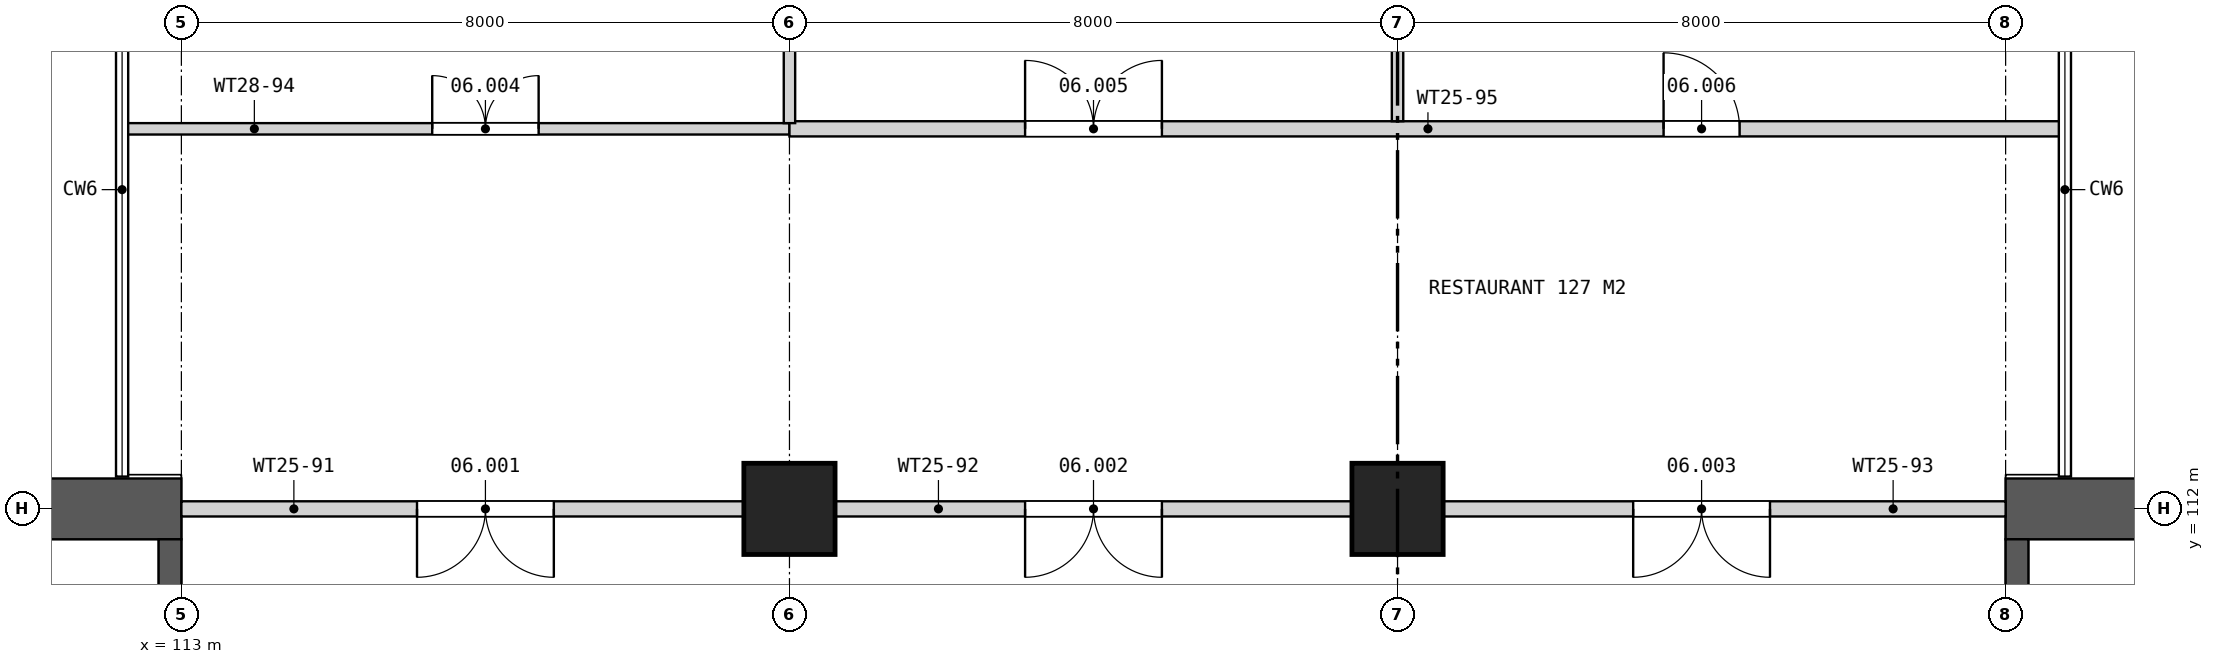
"""IFC4 building model, lengths in metres.
Left out: names, types, materials, properties, quantities, classifications, styles, units other than length and angle.
Written with IfcOpenShell. Run it as: python <this file> out.ifc"""

import sys

from ifc_helpers import new_model, si_unit, direction, frame, frame_2d, origin, origin_2d, place, context, subcontext, project, spatial, rectangle, extrude, element, fill, save


model = new_model("IFC4")
c1 = context("Model", 3, precision=1e-05, world=origin(), true_north=direction((0.0, 1.0)))
c2 = subcontext(c1, "Body", "Model", "MODEL_VIEW")
j1 = project(units=[si_unit("LENGTHUNIT", "METRE"), si_unit("PLANEANGLEUNIT", "RADIAN")], contexts=[c1])
p1 = place(None, origin())
s1 = spatial("IfcSite", under=j1, at=p1, CompositionType="ELEMENT")
p2 = place(p1, origin())
s2 = spatial("IfcBuilding", under=s1, at=p2, CompositionType="ELEMENT")
p3 = place(p2, frame((0.0, 0.0, 47.5)))
s3 = spatial("IfcBuildingStorey", under=s2, at=p3, CompositionType="ELEMENT", Elevation=47.5)
for number, where, z_axis, x_axis in (
    (1, (121.0, 112.0, 0.0), (0.0, 0.0, 1.0), (1.0, 0.0, 0.0)),
    (2, (129.0, 112.0, 0.0), (0.0, 0.0, 1.0), (1.0, 0.0, 0.0)),
):
    element("IfcColumn", number, at=place(p3, frame(where, z_axis=z_axis, x_axis=x_axis)), inside=s3, PredefinedType="COLUMN", context=c2, shape_type="SweptSolid", body=[
        extrude(rectangle(XDim=1.2, YDim=1.2, at=origin_2d()), origin(), (0.0, 0.0, 1.0), 6.0),
    ])
p4 = place(p3, frame((137.0, 112.0, 0.0), z_axis=(0.0, 0.0, 1.0), x_axis=(1.0, 0.0, 0.0)))
e3 = element("IfcWall", 3, at=p4, inside=s3, PredefinedType="SHEAR", context=c2, shape_type="SweptSolid", body=[
    extrude(rectangle(XDim=7.1, YDim=0.8, at=frame_2d((3.55, 0.0))), origin(), (0.0, 0.0, 1.0), 6.0),
])
p5 = place(p3, frame((137.15, 105.7, 0.0), z_axis=(0.0, 0.0, 1.0), x_axis=(0.0, 1.0, 0.0)))
e4 = element("IfcWall", 4, at=p5, inside=s3, PredefinedType="SHEAR", context=c2, shape_type="SweptSolid", body=[
    extrude(rectangle(XDim=5.9, YDim=0.3, at=frame_2d((2.95, 0.0))), origin(), (0.0, 0.0, 1.0), 6.0),
])
p6 = place(p3, frame((113.0, 112.0, 0.0), z_axis=(0.0, 0.0, 1.0), x_axis=(-1.0, 0.0, 0.0)))
e5 = element("IfcWall", 5, at=p6, inside=s3, PredefinedType="SHEAR", context=c2, shape_type="SweptSolid", body=[
    extrude(rectangle(XDim=7.1, YDim=0.8, at=frame_2d((3.55, 0.0))), origin(), (0.0, 0.0, 1.0), 6.0),
])
p7 = place(p3, frame((112.85, 111.6, 0.0), z_axis=(0.0, 0.0, 1.0), x_axis=(0.0, -1.0, 0.0)))
e6 = element("IfcWall", 6, at=p7, inside=s3, PredefinedType="SHEAR", context=c2, shape_type="SweptSolid", body=[
    extrude(rectangle(XDim=5.9, YDim=0.3, at=frame_2d((2.95, 0.0))), origin(), (0.0, 0.0, 1.0), 6.0),
])
p8 = place(p3, frame((113.0, 112.0, 0.0), z_axis=(0.0, 0.0, 1.0), x_axis=(1.0, 0.0, 0.0)))
e7 = element("IfcWall", 7, at=p8, inside=s3, PredefinedType="PARTITIONING", context=c2, shape_type="SweptSolid", body=[
    extrude(rectangle(XDim=7.4, YDim=0.2, at=frame_2d((3.7, 0.0))), origin(), (0.0, 0.0, 1.0), 5.256),
])
p9 = place(p8, frame((3.1, 0.0, 0.0)))
e8 = element("IfcOpeningElement", 8, at=p9, cuts=e7, PredefinedType="OPENING", context=c2, shape_type="SweptSolid", body=[
    extrude(rectangle(XDim=1.8, YDim=2.4, at=frame_2d((0.9, 1.2))), frame((0.0, 0.11, 0.0), z_axis=(0.0, -1.0, 0.0), x_axis=(1.0, 0.0, 0.0)), (0.0, 0.0, 1.0), 0.22),
])
p10 = place(p3, frame((121.6, 112.0, 0.0), z_axis=(0.0, 0.0, 1.0), x_axis=(1.0, 0.0, 0.0)))
e9 = element("IfcWall", 9, at=p10, inside=s3, PredefinedType="PARTITIONING", context=c2, shape_type="SweptSolid", body=[
    extrude(rectangle(XDim=6.8, YDim=0.2, at=frame_2d((3.4, 0.0))), origin(), (0.0, 0.0, 1.0), 5.26),
])
p11 = place(p10, frame((2.5, 0.0, 0.0)))
e10 = element("IfcOpeningElement", 10, at=p11, cuts=e9, PredefinedType="OPENING", context=c2, shape_type="SweptSolid", body=[
    extrude(rectangle(XDim=1.8, YDim=2.4, at=frame_2d((0.9, 1.2))), frame((0.0, 0.11, 0.0), z_axis=(0.0, -1.0, 0.0), x_axis=(1.0, 0.0, 0.0)), (0.0, 0.0, 1.0), 0.22),
])
p12 = place(p3, frame((129.6, 112.0, 0.0), z_axis=(0.0, 0.0, 1.0), x_axis=(1.0, 0.0, 0.0)))
e11 = element("IfcWall", 11, at=p12, inside=s3, PredefinedType="PARTITIONING", context=c2, shape_type="SweptSolid", body=[
    extrude(rectangle(XDim=7.4, YDim=0.2, at=frame_2d((3.7, 0.0))), origin(), (0.0, 0.0, 1.0), 5.256),
])
p13 = place(p12, frame((2.5, 0.0, 0.0)))
e12 = element("IfcOpeningElement", 12, at=p13, cuts=e11, PredefinedType="OPENING", context=c2, shape_type="SweptSolid", body=[
    extrude(rectangle(XDim=1.8, YDim=2.4, at=frame_2d((0.9, 1.2))), frame((0.0, 0.11, 0.0), z_axis=(0.0, -1.0, 0.0), x_axis=(1.0, 0.0, 0.0)), (0.0, 0.0, 1.0), 0.22),
])
p14 = place(p3, frame((112.2, 117.0, 0.0), z_axis=(0.0, 0.0, 1.0), x_axis=(1.0, 0.0, 0.0)))
e13 = element("IfcWall", 13, at=p14, inside=s3, PredefinedType="SOLIDWALL", context=c2, shape_type="SweptSolid", body=[
    extrude(rectangle(XDim=8.8, YDim=0.15, at=frame_2d((4.4, 0.0))), origin(), (0.0, 0.0, 1.0), 5.26),
])
p15 = place(p14, frame((4.1, 0.0, 0.0)))
e14 = element("IfcOpeningElement", 14, at=p15, cuts=e13, PredefinedType="OPENING", context=c2, shape_type="SweptSolid", body=[
    extrude(rectangle(XDim=1.4, YDim=2.2, at=frame_2d((0.7, 1.1))), frame((0.0, 0.085, 0.0), z_axis=(0.0, -1.0, 0.0), x_axis=(1.0, 0.0, 0.0)), (0.0, 0.0, 1.0), 0.17),
])
p16 = place(p3, frame((121.0, 117.0, 0.0), z_axis=(0.0, 0.0, 1.0), x_axis=(1.0, 0.0, 0.0)))
e15 = element("IfcWall", 15, at=p16, inside=s3, PredefinedType="PARTITIONING", context=c2, shape_type="SweptSolid", body=[
    extrude(rectangle(XDim=16.8, YDim=0.2, at=frame_2d((8.4, 0.0))), origin(), (0.0, 0.0, 1.0), 5.26),
])
p17 = place(p16, frame((3.1, 0.0, 0.0)))
e16 = element("IfcOpeningElement", 16, at=p17, cuts=e15, PredefinedType="OPENING", context=c2, shape_type="SweptSolid", body=[
    extrude(rectangle(XDim=1.8, YDim=2.4, at=frame_2d((0.9, 1.2))), frame((0.0, 0.11, 0.0), z_axis=(0.0, -1.0, 0.0), x_axis=(1.0, 0.0, 0.0)), (0.0, 0.0, 1.0), 0.22),
])
p18 = place(p16, frame((11.5, 0.0, 0.0)))
e17 = element("IfcOpeningElement", 17, at=p18, cuts=e15, PredefinedType="OPENING", context=c2, shape_type="SweptSolid", body=[
    extrude(rectangle(XDim=1.0, YDim=2.1, at=frame_2d((0.5, 1.05))), frame((0.0, 0.11, 0.0), z_axis=(0.0, -1.0, 0.0), x_axis=(1.0, 0.0, 0.0)), (0.0, 0.0, 1.0), 0.22),
])
p19 = place(p3, frame((121.0, 117.075, 0.0), z_axis=(0.0, 0.0, 1.0), x_axis=(0.0, 1.0, 0.0)))
e18 = element("IfcWall", 18, at=p19, inside=s3, PredefinedType="SOLIDWALL", context=c2, shape_type="SweptSolid", body=[
    extrude(rectangle(XDim=19.625, YDim=0.15, at=frame_2d((9.812, 0.0))), origin(), (0.0, 0.0, 1.0), 2.7),
])
p20 = place(p19, frame((6.225, 0.0, 0.0)))
e19 = element("IfcOpeningElement", 19, at=p20, cuts=e18, PredefinedType="OPENING", context=c2, shape_type="SweptSolid", body=[
    extrude(rectangle(XDim=1.4, YDim=2.2, at=frame_2d((0.7, 1.1))), frame((0.0, 0.085, 0.0), z_axis=(0.0, -1.0, 0.0), x_axis=(1.0, 0.0, 0.0)), (0.0, 0.0, 1.0), 0.17),
])
p21 = place(p3, frame((129.0, 117.1, 0.0), z_axis=(0.0, 0.0, 1.0), x_axis=(0.0, 1.0, 0.0)))
e20 = element("IfcWall", 20, at=p21, inside=s3, PredefinedType="PARTITIONING", context=c2, shape_type="SweptSolid", body=[
    extrude(rectangle(XDim=10.9, YDim=0.15, at=frame_2d((5.45, 0.0))), origin(), (0.0, 0.0, 1.0), 2.7),
])
p22 = place(p9, frame((1.8, 0.0, 0.0), z_axis=(0.0, 0.0, 1.0), x_axis=(-1.0, 0.0, 0.0)))
e21 = element("IfcDoor", 21, at=p22, inside=s3, OperationType="DOUBLE_DOOR_SINGLE_SWING", PredefinedType="DOOR", context=c2, shape_type="SweptSolid", body=[
    extrude(rectangle(XDim=1.8, YDim=2.4, at=frame_2d((0.9, 1.2))), frame((0.0, 0.025, 0.0), z_axis=(0.0, -1.0, 0.0), x_axis=(1.0, 0.0, 0.0)), (0.0, 0.0, 1.0), 0.05),
])
fill(e8, e21)
p23 = place(p11, frame((1.8, 0.0, 0.0), z_axis=(0.0, 0.0, 1.0), x_axis=(-1.0, 0.0, 0.0)))
e22 = element("IfcDoor", 22, at=p23, inside=s3, OperationType="DOUBLE_DOOR_SINGLE_SWING", PredefinedType="DOOR", context=c2, shape_type="SweptSolid", body=[
    extrude(rectangle(XDim=1.8, YDim=2.4, at=frame_2d((0.9, 1.2))), frame((0.0, 0.025, 0.0), z_axis=(0.0, -1.0, 0.0), x_axis=(1.0, 0.0, 0.0)), (0.0, 0.0, 1.0), 0.05),
])
fill(e10, e22)
p24 = place(p13, frame((1.8, 0.0, 0.0), z_axis=(0.0, 0.0, 1.0), x_axis=(-1.0, 0.0, 0.0)))
e23 = element("IfcDoor", 23, at=p24, inside=s3, OperationType="DOUBLE_DOOR_SINGLE_SWING", PredefinedType="DOOR", context=c2, shape_type="SweptSolid", body=[
    extrude(rectangle(XDim=1.8, YDim=2.4, at=frame_2d((0.9, 1.2))), frame((0.0, 0.025, 0.0), z_axis=(0.0, -1.0, 0.0), x_axis=(1.0, 0.0, 0.0)), (0.0, 0.0, 1.0), 0.05),
])
fill(e12, e23)
p25 = place(p15, origin())
e24 = element("IfcDoor", 24, at=p25, inside=s3, OperationType="DOUBLE_DOOR_SINGLE_SWING", PredefinedType="DOOR", context=c2, shape_type="SweptSolid", body=[
    extrude(rectangle(XDim=1.4, YDim=2.2, at=frame_2d((0.7, 1.1))), frame((0.0, 0.025, 0.0), z_axis=(0.0, -1.0, 0.0), x_axis=(1.0, 0.0, 0.0)), (0.0, 0.0, 1.0), 0.05),
])
fill(e14, e24)
p26 = place(p17, origin())
e25 = element("IfcDoor", 25, at=p26, inside=s3, OperationType="DOUBLE_DOOR_SINGLE_SWING", PredefinedType="DOOR", context=c2, shape_type="SweptSolid", body=[
    extrude(rectangle(XDim=1.8, YDim=2.4, at=frame_2d((0.9, 1.2))), frame((0.0, 0.025, 0.0), z_axis=(0.0, -1.0, 0.0), x_axis=(1.0, 0.0, 0.0)), (0.0, 0.0, 1.0), 0.05),
])
fill(e16, e25)
p27 = place(p18, origin())
e26 = element("IfcDoor", 26, at=p27, inside=s3, OperationType="SINGLE_SWING_LEFT", PredefinedType="DOOR", context=c2, shape_type="SweptSolid", body=[
    extrude(rectangle(XDim=1.0, YDim=2.1, at=frame_2d((0.5, 1.05))), frame((0.0, 0.025, 0.0), z_axis=(0.0, -1.0, 0.0), x_axis=(1.0, 0.0, 0.0)), (0.0, 0.0, 1.0), 0.05),
])
fill(e17, e26)
save(model, sys.argv[1])
